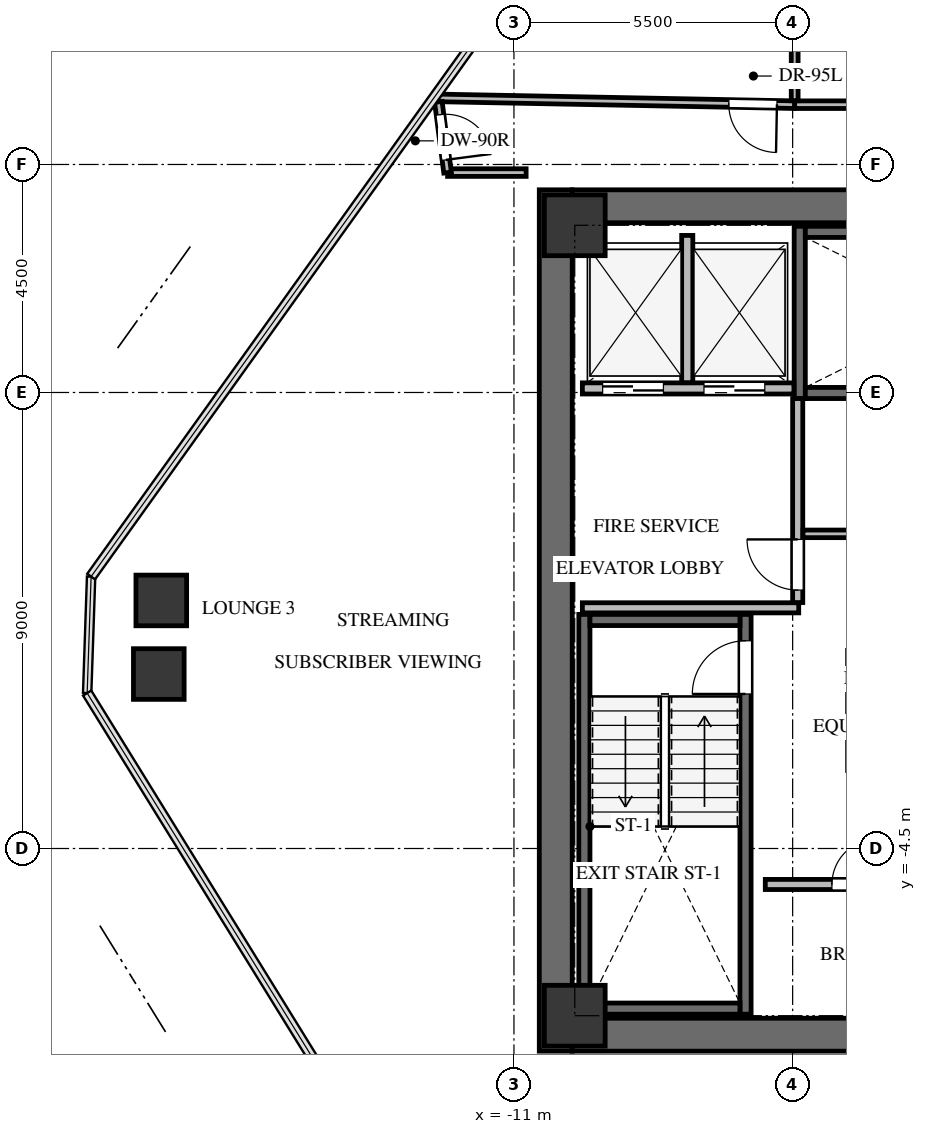
"""IFC4 building model, lengths in metres.
Left out: names, types, materials, properties, quantities, classifications, styles, units other than length and angle.
Written with IfcOpenShell. Run it as: python <this file> out.ifc"""

import sys

from ifc_helpers import new_model, si_unit, direction, frame, frame_2d, origin, origin_2d, place, context, subcontext, project, spatial, rectangle, extrude, source, transform, mapped, element, fill, save


model = new_model("IFC4")
c1 = context("Model", 3, precision=1e-05, world=origin(), true_north=direction((0.0, 1.0)))
c2 = subcontext(c1, "Body", "Model", "MODEL_VIEW")
j1 = project(units=[si_unit("LENGTHUNIT", "METRE"), si_unit("PLANEANGLEUNIT", "RADIAN")], contexts=[c1])
p1 = place(None, origin())
s1 = spatial("IfcSite", under=j1, at=p1, CompositionType="ELEMENT")
p2 = place(p1, origin())
s2 = spatial("IfcBuilding", under=s1, at=p2, CompositionType="ELEMENT")
p3 = place(p2, frame((0.0, 0.0, 187.0)))
s3 = spatial("IfcBuildingStorey", under=s2, at=p3, CompositionType="ELEMENT", Elevation=187.0)
p4 = place(p3, frame((-10.175, -8.5, 0.0), z_axis=(0.0, 0.0, 1.0), x_axis=(0.0, 1.0, 0.0)))
e1 = element("IfcWall", 1, at=p4, inside=s3, PredefinedType="SHEAR", context=c2, shape_type="SweptSolid", body=[
    extrude(rectangle(XDim=17.0, YDim=0.65, at=frame_2d((8.5, 0.0))), origin(), (0.0, 0.0, 1.0), 3.3),
])
p5 = place(p3, frame((-9.85, -8.175, 0.0), z_axis=(0.0, 0.0, 1.0), x_axis=(1.0, 0.0, 0.0)))
e2 = element("IfcWall", 2, at=p5, inside=s3, PredefinedType="SHEAR", context=c2, shape_type="SweptSolid", body=[
    extrude(rectangle(XDim=7.75, YDim=0.65, at=frame_2d((3.875, 0.0))), origin(), (0.0, 0.0, 1.0), 3.3),
])
p6 = place(p3, frame((-9.85, 8.175, 0.0), z_axis=(0.0, 0.0, 1.0), x_axis=(1.0, 0.0, 0.0)))
e3 = element("IfcWall", 3, at=p6, inside=s3, PredefinedType="SHEAR", context=c2, shape_type="SweptSolid", body=[
    extrude(rectangle(XDim=19.7, YDim=0.65, at=frame_2d((9.85, 0.0))), origin(), (0.0, 0.0, 1.0), 3.3),
])
p7 = place(p3, frame((-6.43, -7.77, -0.24), z_axis=(0.0, 0.0, 1.0), x_axis=(0.0, 1.0, 0.0)))
e4 = element("IfcWall", 4, at=p7, inside=s3, PredefinedType="SHEAR", context=c2, shape_type="SweptSolid", body=[
    extrude(rectangle(XDim=7.89, YDim=0.22, at=frame_2d((3.945, 0.0))), origin(), (0.0, 0.0, 1.0), 3.3),
])
p8 = place(p7, frame((6.32, 0.0, 0.0)))
e5 = element("IfcOpeningElement", 5, at=p8, cuts=e4, PredefinedType="OPENING", context=c2, shape_type="SweptSolid", body=[
    extrude(rectangle(XDim=1.05, YDim=2.15, at=frame_2d((0.525, 1.075))), frame((0.0, 0.12, 0.0), z_axis=(0.0, -1.0, 0.0), x_axis=(1.0, 0.0, 0.0)), (0.0, 0.0, 1.0), 0.24),
])
p9 = place(p3, frame((-9.61, 0.12, -0.24), z_axis=(0.0, 0.0, 1.0), x_axis=(0.0, -1.0, 0.0)))
e6 = element("IfcWall", 6, at=p9, inside=s3, PredefinedType="SHEAR", context=c2, shape_type="SweptSolid", body=[
    extrude(rectangle(XDim=7.89, YDim=0.22, at=frame_2d((3.945, 0.0))), origin(), (0.0, 0.0, 1.0), 3.3),
])
for number, where, z_axis, x_axis in (
    (7, (-9.5, -7.66, -0.24), (0.0, 0.0, 1.0), (1.0, 0.0, 0.0)),
    (8, (-6.54, 0.01, -0.24), (0.0, 0.0, 1.0), (-1.0, 0.0, 0.0)),
):
    element("IfcWall", number, at=place(p3, frame(where, z_axis=z_axis, x_axis=x_axis)), inside=s3, PredefinedType="SHEAR", context=c2, shape_type="SweptSolid", body=[
        extrude(rectangle(XDim=2.96, YDim=0.22, at=frame_2d((1.48, 0.0))), origin(), (0.0, 0.0, 1.0), 3.3),
    ])
p10 = place(p3, frame((-5.36, 7.78, -0.24), z_axis=(0.0, 0.0, 1.0), x_axis=(0.0, -1.0, 0.0)))
e9 = element("IfcWall", 9, at=p10, inside=s3, PredefinedType="SHEAR", context=c2, shape_type="SweptSolid", body=[
    extrude(rectangle(XDim=3.4, YDim=0.22, at=frame_2d((1.7, 0.0))), origin(), (0.0, 0.0, 1.0), 3.3),
])
p11 = place(p3, frame((-5.25, 4.49, -0.24), z_axis=(0.0, 0.0, 1.0), x_axis=(1.0, 0.0, 0.0)))
e10 = element("IfcWall", 10, at=p11, inside=s3, PredefinedType="SHEAR", context=c2, shape_type="SweptSolid", body=[
    extrude(rectangle(XDim=7.35, YDim=0.22, at=frame_2d((3.675, 0.0))), origin(), (0.0, 0.0, 1.0), 3.3),
])
p12 = place(p11, frame((5.85, 0.0, 0.0)))
e11 = element("IfcOpeningElement", 11, at=p12, cuts=e10, PredefinedType="OPENING", context=c2, shape_type="SweptSolid", body=[
    extrude(rectangle(XDim=1.05, YDim=2.15, at=frame_2d((0.525, 1.075))), frame((0.0, 0.12, 0.0), z_axis=(0.0, -1.0, 0.0), x_axis=(1.0, 0.0, 0.0)), (0.0, 0.0, 1.0), 0.24),
])
p13 = place(p3, frame((2.1, 7.67, -0.24), z_axis=(0.0, 0.0, 1.0), x_axis=(-1.0, 0.0, 0.0)))
e12 = element("IfcWall", 12, at=p13, inside=s3, PredefinedType="SHEAR", context=c2, shape_type="SweptSolid", body=[
    extrude(rectangle(XDim=7.35, YDim=0.22, at=frame_2d((3.675, 0.0))), origin(), (0.0, 0.0, 1.0), 3.3),
])
m1 = source(origin(), c2, "Body", "SweptSolid", [
    extrude(rectangle(XDim=1.2, YDim=1.2, at=origin_2d()), origin(), (0.0, 0.0, 1.0), 3.3),
])
for number, where, z_axis, x_axis in (
    (13, (-9.8, -7.8, -0.24), (0.0, 0.0, 1.0), (1.0, 0.0, 0.0)),
    (14, (-9.8, 7.8, -0.24), (0.0, 0.0, 1.0), (1.0, 0.0, 0.0)),
):
    element("IfcColumn", number, at=place(p3, frame(where, z_axis=z_axis, x_axis=x_axis)), inside=s3, PredefinedType="COLUMN", context=c2, shape_type="MappedRepresentation", body=[
        mapped(m1, transform((0.0, 0.0, 0.0), x_axis=(1.0, 0.0, 0.0), y_axis=(0.0, 1.0, 0.0), z_axis=(0.0, 0.0, 1.0), scale=1.0)),
    ])
m2 = source(origin(), c2, "Body", "SweptSolid", [
    extrude(rectangle(XDim=1.0, YDim=1.0, at=origin_2d()), origin(), (0.0, 0.0, 1.0), 3.3),
])
for number, where, z_axis, x_axis in (
    (15, (-18.009, -1.057, -0.24), (0.0, 0.0, 1.0), (1.0, 0.0, 0.0)),
    (16, (-17.96, 0.396, -0.24), (0.0, 0.0, 1.0), (1.0, 0.0, 0.0)),
):
    element("IfcColumn", number, at=place(p3, frame(where, z_axis=z_axis, x_axis=x_axis)), inside=s3, PredefinedType="COLUMN", context=c2, shape_type="MappedRepresentation", body=[
        mapped(m2, transform((0.0, 0.0, 0.0), x_axis=(1.0, 0.0, 0.0), y_axis=(0.0, 1.0, 0.0), z_axis=(0.0, 0.0, 1.0), scale=1.0)),
    ])
p14 = place(p3, frame((-9.65, 4.58, 0.0), z_axis=(0.0, 0.0, 1.0), x_axis=(1.0, 0.0, 0.0)))
e17 = element("IfcWall", 17, at=p14, inside=s3, PredefinedType="SOLIDWALL", context=c2, shape_type="SweptSolid", body=[
    extrude(rectangle(XDim=4.175, YDim=0.22, at=frame_2d((2.087, 0.0))), origin(), (0.0, 0.0, 1.0), 3.045),
])
p15 = place(p14, frame((0.4, 0.0, 0.0)))
e18 = element("IfcOpeningElement", 18, at=p15, cuts=e17, PredefinedType="OPENING", context=c2, shape_type="SweptSolid", body=[
    extrude(rectangle(XDim=1.2, YDim=2.15, at=frame_2d((0.6, 1.075))), frame((0.0, 0.12, 0.0), z_axis=(0.0, -1.0, 0.0), x_axis=(1.0, 0.0, 0.0)), (0.0, 0.0, 1.0), 0.24),
])
p16 = place(p14, frame((2.4, 0.0, 0.0)))
e19 = element("IfcOpeningElement", 19, at=p16, cuts=e17, PredefinedType="OPENING", context=c2, shape_type="SweptSolid", body=[
    extrude(rectangle(XDim=1.2, YDim=2.15, at=frame_2d((0.6, 1.075))), frame((0.0, 0.12, 0.0), z_axis=(0.0, -1.0, 0.0), x_axis=(1.0, 0.0, 0.0)), (0.0, 0.0, 1.0), 0.24),
])
p17 = place(p3, frame((-7.58, 4.694, 0.0), z_axis=(0.0, 0.0, 1.0), x_axis=(0.0, 1.0, 0.0)))
e20 = element("IfcWall", 20, at=p17, inside=s3, PredefinedType="SOLIDWALL", context=c2, shape_type="SweptSolid", body=[
    extrude(rectangle(XDim=2.906, YDim=0.22, at=frame_2d((1.453, 0.0))), origin(), (0.0, 0.0, 1.0), 3.045),
])
p18 = place(p3, frame((-9.65, 0.25, 0.0), z_axis=(0.0, 0.0, 1.0), x_axis=(1.0, 0.0, 0.0)))
e21 = element("IfcWall", 21, at=p18, inside=s3, PredefinedType="SOLIDWALL", context=c2, shape_type="SweptSolid", body=[
    extrude(rectangle(XDim=4.27, YDim=0.2, at=frame_2d((2.135, 0.0))), origin(), (0.0, 0.0, 1.0), 3.045),
])
p19 = place(p3, frame((-5.4, 0.354, 0.0), z_axis=(0.0, 0.0, 1.0), x_axis=(0.0, 1.0, 0.0)))
e22 = element("IfcWall", 22, at=p19, inside=s3, PredefinedType="SOLIDWALL", context=c2, shape_type="SweptSolid", body=[
    extrude(rectangle(XDim=4.026, YDim=0.2, at=frame_2d((2.013, 0.0))), origin(), (0.0, 0.0, 1.0), 3.045),
])
p20 = place(p19, frame((0.246, 0.0, 0.0)))
e23 = element("IfcOpeningElement", 23, at=p20, cuts=e22, PredefinedType="OPENING", context=c2, shape_type="SweptSolid", body=[
    extrude(rectangle(XDim=1.0, YDim=2.15, at=frame_2d((0.5, 1.075))), frame((0.0, 0.11, 0.0), z_axis=(0.0, -1.0, 0.0), x_axis=(1.0, 0.0, 0.0)), (0.0, 0.0, 1.0), 0.22),
])
p21 = place(p3, frame((-6.04, -5.21, 0.0), z_axis=(0.0, 0.0, 1.0), x_axis=(1.0, 0.0, 0.0)))
e24 = element("IfcWall", 24, at=p21, inside=s3, PredefinedType="SOLIDWALL", context=c2, shape_type="SweptSolid", body=[
    extrude(rectangle(XDim=3.53, YDim=0.2, at=frame_2d((1.765, 0.0))), origin(), (0.0, 0.0, 1.0), 3.045),
])
p22 = place(p21, frame((1.315, 0.0, 0.0)))
e25 = element("IfcOpeningElement", 25, at=p22, cuts=e24, PredefinedType="OPENING", context=c2, shape_type="SweptSolid", body=[
    extrude(rectangle(XDim=0.9, YDim=2.05, at=frame_2d((0.45, 1.025))), frame((0.0, 0.11, 0.0), z_axis=(0.0, -1.0, 0.0), x_axis=(1.0, 0.0, 0.0)), (0.0, 0.0, 1.0), 0.22),
])
p23 = place(p3, frame((-2.42, 1.71, 0.0), z_axis=(0.0, 0.0, 1.0), x_axis=(-1.0, 0.0, 0.0)))
e26 = element("IfcWall", 26, at=p23, inside=s3, PredefinedType="PARTITIONING", context=c2, shape_type="SweptSolid", body=[
    extrude(rectangle(XDim=2.876, YDim=0.15, at=frame_2d((1.438, 0.0))), origin(), (0.0, 0.0, 1.0), 3.045),
])
p24 = place(p23, frame((0.988, 0.0, 0.0)))
e27 = element("IfcOpeningElement", 27, at=p24, cuts=e26, PredefinedType="OPENING", context=c2, shape_type="SweptSolid", body=[
    extrude(rectangle(XDim=0.9, YDim=2.05, at=frame_2d((0.45, 1.025))), frame((0.0, 0.085, 0.0), z_axis=(0.0, -1.0, 0.0), x_axis=(1.0, 0.0, 0.0)), (0.0, 0.0, 1.0), 0.17),
])
p25 = place(p3, frame((-5.46, 10.18, 0.0), z_axis=(0.0, 0.0, 1.0), x_axis=(-0.99981828266, 0.019063096779, 0.0)))
e28 = element("IfcWall", 28, at=p25, inside=s3, PredefinedType="PARTITIONING", context=c2, shape_type="SweptSolid", body=[
    extrude(rectangle(XDim=7.121, YDim=0.15, at=frame_2d((3.56, 0.0))), origin(), (0.0, 0.0, 1.0), 2.242),
])
p26 = place(p25, frame((0.35, 0.0, 0.0)))
e29 = element("IfcOpeningElement", 29, at=p26, cuts=e28, PredefinedType="OPENING", context=c2, shape_type="SweptSolid", body=[
    extrude(rectangle(XDim=0.95, YDim=2.1, at=frame_2d((0.475, 1.05))), frame((0.0, 0.085, 0.0), z_axis=(0.0, -1.0, 0.0), x_axis=(1.0, 0.0, 0.0)), (0.0, 0.0, 1.0), 0.17),
])
p27 = place(p3, frame((-1.089, 10.18, 0.0), z_axis=(0.0, 0.0, 1.0), x_axis=(-1.0, 0.0, 0.0)))
e30 = element("IfcWall", 30, at=p27, inside=s3, PredefinedType="PARTITIONING", context=c2, shape_type="SweptSolid", body=[
    extrude(rectangle(XDim=4.371, YDim=0.15, at=frame_2d((2.186, 0.0))), origin(), (0.0, 0.0, 1.0), 2.608),
])
p28 = place(p3, frame((-12.31, 8.84, 0.0), z_axis=(0.0, 0.0, 1.0), x_axis=(1.0, 0.0, 0.0)))
e31 = element("IfcWall", 31, at=p28, inside=s3, PredefinedType="PARTITIONING", context=c2, shape_type="SweptSolid", body=[
    extrude(rectangle(XDim=1.55, YDim=0.15, at=frame_2d((0.775, 0.0))), origin(), (0.0, 0.0, 1.0), 2.399),
])
p29 = place(p3, frame((-12.492, 10.235, 0.0), z_axis=(0.0, 0.0, 1.0), x_axis=(0.129309502928, -0.991604282187, 0.0)))
e32 = element("IfcWall", 32, at=p29, inside=s3, PredefinedType="PARTITIONING", context=c2, shape_type="SweptSolid", body=[
    extrude(rectangle(XDim=1.406, YDim=0.15, at=frame_2d((0.703, 0.0))), origin(), (0.0, 0.0, 1.0), 3.045),
])
p30 = place(p29, frame((0.253, 0.0, 0.0)))
e33 = element("IfcOpeningElement", 33, at=p30, cuts=e32, PredefinedType="OPENING", context=c2, shape_type="SweptSolid", body=[
    extrude(rectangle(XDim=0.9, YDim=2.05, at=frame_2d((0.45, 1.025))), frame((0.0, 0.085, 0.0), z_axis=(0.0, -1.0, 0.0), x_axis=(1.0, 0.0, 0.0)), (0.0, 0.0, 1.0), 0.17),
])
p31 = place(p3, frame((-5.46, 16.418, 0.0), z_axis=(0.0, 0.0, 1.0), x_axis=(0.0, -1.0, 0.0)))
e34 = element("IfcWall", 34, at=p31, inside=s3, PredefinedType="PARTITIONING", context=c2, shape_type="SweptSolid", body=[
    extrude(rectangle(XDim=6.159, YDim=0.135, at=frame_2d((3.08, 0.0))), origin(), (0.0, 0.0, 1.0), 2.399),
])
m3 = source(origin(), c2, "Body", "SweptSolid", [
    extrude(rectangle(XDim=1.05, YDim=2.15, at=frame_2d((0.525, 1.075))), frame((0.0, 0.025, 0.0), z_axis=(0.0, -1.0, 0.0), x_axis=(1.0, 0.0, 0.0)), (0.0, 0.0, 1.0), 0.05),
])
p32 = place(p8, origin())
e35 = element("IfcDoor", 35, at=p32, inside=s3, OperationType="SINGLE_SWING_LEFT", PredefinedType="DOOR", context=c2, shape_type="MappedRepresentation", body=[
    mapped(m3, transform((0.0, 0.0, 0.0), x_axis=(1.0, 0.0, 0.0), y_axis=(0.0, 1.0, 0.0), z_axis=(0.0, 0.0, 1.0), scale=1.0)),
])
fill(e5, e35)
m4 = source(origin(), c2, "Body", "SweptSolid", [
    extrude(rectangle(XDim=1.2, YDim=2.15, at=frame_2d((0.6, 1.075))), frame((0.0, 0.025, 0.0), z_axis=(0.0, -1.0, 0.0), x_axis=(1.0, 0.0, 0.0)), (0.0, 0.0, 1.0), 0.05),
])
p33 = place(p15, origin())
e36 = element("IfcDoor", 36, at=p33, inside=s3, OperationType="DOUBLE_DOOR_SLIDING", PredefinedType="DOOR", context=c2, shape_type="MappedRepresentation", body=[
    mapped(m4, transform((0.0, 0.0, 0.0), x_axis=(1.0, 0.0, 0.0), y_axis=(0.0, 1.0, 0.0), z_axis=(0.0, 0.0, 1.0), scale=1.0)),
])
fill(e18, e36)
p34 = place(p16, origin())
e37 = element("IfcDoor", 37, at=p34, inside=s3, OperationType="DOUBLE_DOOR_SLIDING", PredefinedType="DOOR", context=c2, shape_type="MappedRepresentation", body=[
    mapped(m4, transform((0.0, 0.0, 0.0), x_axis=(1.0, 0.0, 0.0), y_axis=(0.0, 1.0, 0.0), z_axis=(0.0, 0.0, 1.0), scale=1.0)),
])
fill(e19, e37)
m5 = source(origin(), c2, "Body", "SweptSolid", [
    extrude(rectangle(XDim=1.0, YDim=2.15, at=frame_2d((0.5, 1.075))), frame((0.0, 0.025, 0.0), z_axis=(0.0, -1.0, 0.0), x_axis=(1.0, 0.0, 0.0)), (0.0, 0.0, 1.0), 0.05),
])
p35 = place(p20, origin())
e38 = element("IfcDoor", 38, at=p35, inside=s3, OperationType="SINGLE_SWING_RIGHT", PredefinedType="DOOR", context=c2, shape_type="MappedRepresentation", body=[
    mapped(m5, transform((0.0, 0.0, 0.0), x_axis=(1.0, 0.0, 0.0), y_axis=(0.0, 1.0, 0.0), z_axis=(0.0, 0.0, 1.0), scale=1.0)),
])
fill(e23, e38)
m6 = source(origin(), c2, "Body", "SweptSolid", [
    extrude(rectangle(XDim=0.9, YDim=2.05, at=frame_2d((0.45, 1.025))), frame((0.0, 0.025, 0.0), z_axis=(0.0, -1.0, 0.0), x_axis=(1.0, 0.0, 0.0)), (0.0, 0.0, 1.0), 0.05),
])
p36 = place(p22, origin())
e39 = element("IfcDoor", 39, at=p36, inside=s3, OperationType="SINGLE_SWING_RIGHT", PredefinedType="DOOR", context=c2, shape_type="MappedRepresentation", body=[
    mapped(m6, transform((0.0, 0.0, 0.0), x_axis=(1.0, 0.0, 0.0), y_axis=(0.0, 1.0, 0.0), z_axis=(0.0, 0.0, 1.0), scale=1.0)),
])
fill(e25, e39)
m7 = source(origin(), c2, "Body", "SweptSolid", [
    extrude(rectangle(XDim=0.95, YDim=2.1, at=frame_2d((0.475, 1.05))), frame((0.0, 0.025, 0.0), z_axis=(0.0, -1.0, 0.0), x_axis=(1.0, 0.0, 0.0)), (0.0, 0.0, 1.0), 0.05),
])
p37 = place(p26, origin())
e40 = element("IfcDoor", 40, at=p37, inside=s3, OperationType="SINGLE_SWING_LEFT", PredefinedType="DOOR", context=c2, shape_type="MappedRepresentation", body=[
    mapped(m7, transform((0.0, 0.0, 0.0), x_axis=(1.0, 0.0, 0.0), y_axis=(0.0, 1.0, 0.0), z_axis=(0.0, 0.0, 1.0), scale=1.0)),
])
fill(e29, e40)
m8 = source(origin(), c2, "Body", "SweptSolid", [
    extrude(rectangle(XDim=0.9, YDim=2.05, at=frame_2d((0.45, 1.025))), frame((0.0, 0.025, 0.0), z_axis=(0.0, -1.0, 0.0), x_axis=(1.0, 0.0, 0.0)), (0.0, 0.0, 1.0), 0.05),
])
p38 = place(p30, origin())
e41 = element("IfcDoor", 41, at=p38, inside=s3, OperationType="SINGLE_SWING_RIGHT", PredefinedType="DOOR", context=c2, shape_type="MappedRepresentation", body=[
    mapped(m8, transform((0.0, 0.0, 0.0), x_axis=(1.0, 0.0, 0.0), y_axis=(0.0, 1.0, 0.0), z_axis=(0.0, 0.0, 1.0), scale=1.0)),
])
fill(e33, e41)
save(model, sys.argv[1])
